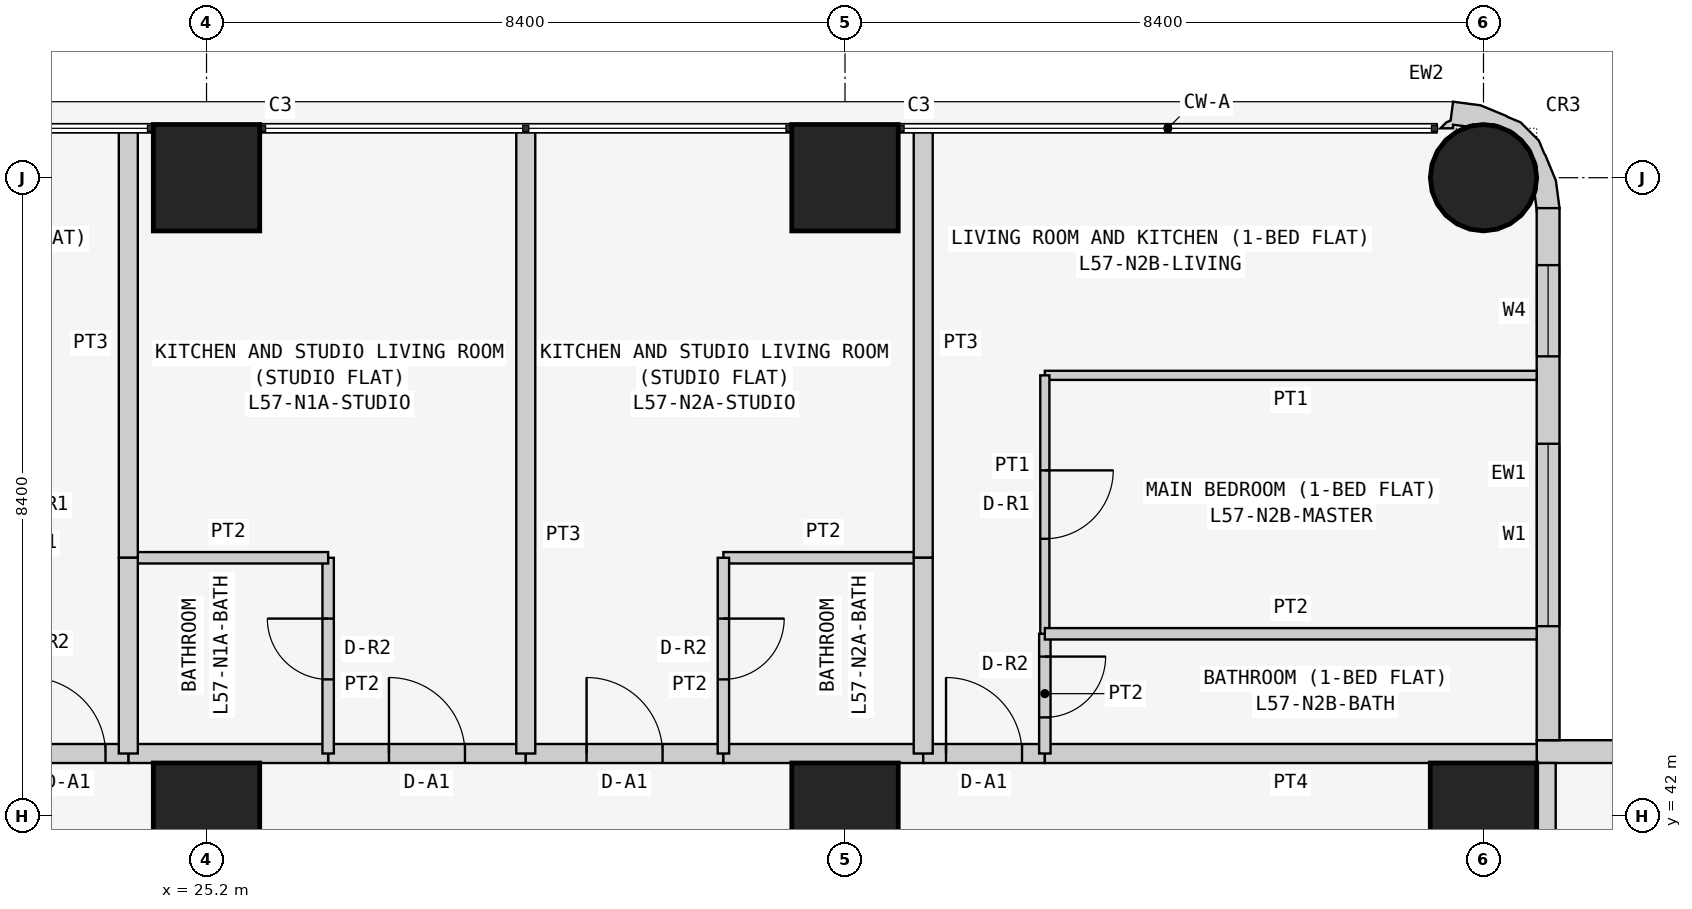
"""IFC4 building model, lengths in metres.
Left out: names, types, materials, properties, quantities, classifications, styles, units other than length and angle.
Written with IfcOpenShell. Run it as: python <this file> out.ifc"""

import sys

from ifc_helpers import new_model, si_unit, direction, frame, frame_2d, origin, origin_2d, place, context, subcontext, project, spatial, polyline, rectangle, circle, outline, extrude, element, fill, save


model = new_model("IFC4")
c1 = context("Model", 3, precision=1e-05, world=origin(), true_north=direction((0.0, 1.0)))
c2 = subcontext(c1, "Body", "Model", "MODEL_VIEW")
j1 = project(units=[si_unit("LENGTHUNIT", "METRE"), si_unit("PLANEANGLEUNIT", "RADIAN")], contexts=[c1])
p1 = place(None, origin())
s1 = spatial("IfcSite", under=j1, at=p1, CompositionType="ELEMENT")
p2 = place(p1, origin())
s2 = spatial("IfcBuilding", under=s1, at=p2, CompositionType="ELEMENT")
p3 = place(p2, frame((0.0, 0.0, 219.3)))
s3 = spatial("IfcBuildingStorey", under=s2, at=p3, CompositionType="ELEMENT", Elevation=219.3)
for number, where, z_axis, x_axis in (
    (1, (25.2, 42.0, 0.0), (0.0, 0.0, 1.0), (1.0, 0.0, 0.0)),
    (2, (25.2, 50.4, 0.0), (0.0, 0.0, 1.0), (1.0, 0.0, 0.0)),
    (3, (33.6, 42.0, 0.0), (0.0, 0.0, 1.0), (1.0, 0.0, 0.0)),
    (4, (33.6, 50.4, 0.0), (0.0, 0.0, 1.0), (1.0, 0.0, 0.0)),
    (5, (42.0, 42.0, 0.0), (0.0, 0.0, 1.0), (1.0, 0.0, 0.0)),
):
    element("IfcColumn", number, at=place(p3, frame(where, z_axis=z_axis, x_axis=x_axis)), inside=s3, PredefinedType="COLUMN", context=c2, shape_type="SweptSolid", body=[
        extrude(rectangle(XDim=1.4, YDim=1.4, at=origin_2d()), origin(), (0.0, 0.0, 1.0), 3.6),
    ])
p4 = place(p3, frame((42.0, 50.4, 0.0), z_axis=(0.0, 0.0, 1.0), x_axis=(1.0, 0.0, 0.0)))
e6 = element("IfcColumn", 6, at=p4, inside=s3, PredefinedType="COLUMN", context=c2, shape_type="SweptSolid", body=[
    extrude(circle(Radius=0.7, at=origin_2d()), origin(), (0.0, 0.0, 1.0), 3.6),
])
p5 = place(p3, frame((50.0, 42.85, 0.0), z_axis=(0.0, 0.0, 1.0), x_axis=(-1.0, 0.0, 0.0)))
e7 = element("IfcWall", 7, at=p5, inside=s3, PredefinedType="SOLIDWALL", context=c2, shape_type="SweptSolid", body=[
    extrude(rectangle(XDim=7.3, YDim=0.3, at=frame_2d((3.65, 0.0))), origin(), (0.0, 0.0, 1.0), 3.45),
])
p6 = place(p5, frame((3.1, 0.0, 0.9)))
e8 = element("IfcOpeningElement", 8, at=p6, cuts=e7, PredefinedType="OPENING", context=c2, shape_type="SweptSolid", body=[
    extrude(rectangle(XDim=2.4, YDim=1.5, at=frame_2d((1.2, 0.75))), frame((0.0, 0.16, 0.0), z_axis=(0.0, -1.0, 0.0), x_axis=(1.0, 0.0, 0.0)), (0.0, 0.0, 1.0), 0.32),
])
p7 = place(p5, frame((0.75, 0.0, 0.9)))
e9 = element("IfcOpeningElement", 9, at=p7, cuts=e7, PredefinedType="OPENING", context=c2, shape_type="SweptSolid", body=[
    extrude(rectangle(XDim=1.2, YDim=1.5, at=frame_2d((0.6, 0.75))), frame((0.0, 0.16, 0.0), z_axis=(0.0, -1.0, 0.0), x_axis=(1.0, 0.0, 0.0)), (0.0, 0.0, 1.0), 0.32),
])
p8 = place(p3, frame((42.85, 43.0, 0.0), z_axis=(0.0, 0.0, 1.0), x_axis=(0.0, 1.0, 0.0)))
e10 = element("IfcWall", 10, at=p8, inside=s3, PredefinedType="SOLIDWALL", context=c2, shape_type="SweptSolid", body=[
    extrude(rectangle(XDim=7.0, YDim=0.3, at=frame_2d((3.5, 0.0))), origin(), (0.0, 0.0, 1.0), 3.45),
])
p9 = place(p8, frame((1.5, 0.0, 0.9)))
e11 = element("IfcOpeningElement", 11, at=p9, cuts=e10, PredefinedType="OPENING", context=c2, shape_type="SweptSolid", body=[
    extrude(rectangle(XDim=2.4, YDim=1.5, at=frame_2d((1.2, 0.75))), frame((0.0, 0.16, 0.0), z_axis=(0.0, -1.0, 0.0), x_axis=(1.0, 0.0, 0.0)), (0.0, 0.0, 1.0), 0.32),
])
p10 = place(p8, frame((5.05, 0.0, 0.9)))
e12 = element("IfcOpeningElement", 12, at=p10, cuts=e10, PredefinedType="OPENING", context=c2, shape_type="SweptSolid", body=[
    extrude(rectangle(XDim=1.2, YDim=1.5, at=frame_2d((0.6, 0.75))), frame((0.0, 0.16, 0.0), z_axis=(0.0, -1.0, 0.0), x_axis=(1.0, 0.0, 0.0)), (0.0, 0.0, 1.0), 0.32),
])
p11 = place(p3, frame((42.724, 50.11, 0.0), z_axis=(0.0, 0.0, 1.0), x_axis=(0.439933741929, 0.898030234854, 0.0)))
e13 = element("IfcWall", 13, at=p11, inside=s3, PredefinedType="SOLIDWALL", context=c2, shape_type="SweptSolid", body=[
    extrude(outline(polyline([(-0.145, -0.044), (0.022, -0.296), (0.327, -0.094), (0.568, 0.18), (0.577, 0.199), (0.7, 0.337), (0.811, 0.661), (0.799, 0.845), (0.803, 0.866), (0.78, 1.231), (0.664, 1.577), (0.426, 1.497), (0.382, 1.536), (0.276, 1.572), (0.349, 1.423), (0.392, 1.444), (0.453, 1.261), (0.51, 1.211), (0.632, 0.961), (0.65, 0.683), (0.56, 0.419), (0.375, 0.21), (0.125, 0.087), (0.05, 0.082), (-0.127, -0.035), (-0.145, -0.044)])), origin(), (0.0, 0.0, 1.0), 3.45),
])
p12 = place(p3, frame((26.8, 42.825, 0.0), z_axis=(0.0, 0.0, 1.0), x_axis=(1.0, 0.0, 0.0)))
e14 = element("IfcWall", 14, at=p12, inside=s3, PredefinedType="PARTITIONING", context=c2, shape_type="SweptSolid", body=[
    extrude(rectangle(XDim=2.6, YDim=0.25, at=frame_2d((1.3, 0.0))), origin(), (0.0, 0.0, 1.0), 3.45),
])
p13 = place(p12, frame((0.8, 0.0, 0.0)))
e15 = element("IfcOpeningElement", 15, at=p13, cuts=e14, PredefinedType="OPENING", context=c2, shape_type="SweptSolid", body=[
    extrude(rectangle(XDim=1.0, YDim=2.1, at=frame_2d((0.5, 1.05))), frame((0.0, 0.135, 0.0), z_axis=(0.0, -1.0, 0.0), x_axis=(1.0, 0.0, 0.0)), (0.0, 0.0, 1.0), 0.27),
])
p14 = place(p3, frame((24.171, 42.825, 0.0), z_axis=(0.0, 0.0, 1.0), x_axis=(1.0, 0.0, 0.0)))
e16 = element("IfcWall", 16, at=p14, inside=s3, PredefinedType="PARTITIONING", context=c2, shape_type="SweptSolid", body=[
    extrude(rectangle(XDim=2.629, YDim=0.25, at=frame_2d((1.314, 0.0))), origin(), (0.0, 0.0, 1.0), 3.45),
])
p15 = place(p3, frame((22.571, 42.825, 0.0), z_axis=(0.0, 0.0, 1.0), x_axis=(1.0, 0.0, 0.0)))
e17 = element("IfcWall", 17, at=p15, inside=s3, PredefinedType="PARTITIONING", context=c2, shape_type="SweptSolid", body=[
    extrude(rectangle(XDim=1.6, YDim=0.25, at=frame_2d((0.8, 0.0))), origin(), (0.0, 0.0, 1.0), 3.45),
])
p16 = place(p15, frame((0.3, 0.0, 0.0)))
e18 = element("IfcOpeningElement", 18, at=p16, cuts=e17, PredefinedType="OPENING", context=c2, shape_type="SweptSolid", body=[
    extrude(rectangle(XDim=1.0, YDim=2.1, at=frame_2d((0.5, 1.05))), frame((0.0, 0.135, 0.0), z_axis=(0.0, -1.0, 0.0), x_axis=(1.0, 0.0, 0.0)), (0.0, 0.0, 1.0), 0.27),
])
p17 = place(p3, frame((29.4, 42.825, 0.0), z_axis=(0.0, 0.0, 1.0), x_axis=(1.0, 0.0, 0.0)))
e19 = element("IfcWall", 19, at=p17, inside=s3, PredefinedType="PARTITIONING", context=c2, shape_type="SweptSolid", body=[
    extrude(rectangle(XDim=2.6, YDim=0.25, at=frame_2d((1.3, 0.0))), origin(), (0.0, 0.0, 1.0), 3.45),
])
p18 = place(p17, frame((0.8, 0.0, 0.0)))
e20 = element("IfcOpeningElement", 20, at=p18, cuts=e19, PredefinedType="OPENING", context=c2, shape_type="SweptSolid", body=[
    extrude(rectangle(XDim=1.0, YDim=2.1, at=frame_2d((0.5, 1.05))), frame((0.0, 0.135, 0.0), z_axis=(0.0, -1.0, 0.0), x_axis=(1.0, 0.0, 0.0)), (0.0, 0.0, 1.0), 0.27),
])
p19 = place(p3, frame((32.0, 42.825, 0.0), z_axis=(0.0, 0.0, 1.0), x_axis=(1.0, 0.0, 0.0)))
e21 = element("IfcWall", 21, at=p19, inside=s3, PredefinedType="PARTITIONING", context=c2, shape_type="SweptSolid", body=[
    extrude(rectangle(XDim=2.629, YDim=0.25, at=frame_2d((1.314, 0.0))), origin(), (0.0, 0.0, 1.0), 3.45),
])
p20 = place(p3, frame((34.629, 42.825, 0.0), z_axis=(0.0, 0.0, 1.0), x_axis=(1.0, 0.0, 0.0)))
e22 = element("IfcWall", 22, at=p20, inside=s3, PredefinedType="PARTITIONING", context=c2, shape_type="SweptSolid", body=[
    extrude(rectangle(XDim=1.6, YDim=0.25, at=frame_2d((0.8, 0.0))), origin(), (0.0, 0.0, 1.0), 3.45),
])
p21 = place(p20, frame((0.3, 0.0, 0.0)))
e23 = element("IfcOpeningElement", 23, at=p21, cuts=e22, PredefinedType="OPENING", context=c2, shape_type="SweptSolid", body=[
    extrude(rectangle(XDim=1.0, YDim=2.1, at=frame_2d((0.5, 1.05))), frame((0.0, 0.135, 0.0), z_axis=(0.0, -1.0, 0.0), x_axis=(1.0, 0.0, 0.0)), (0.0, 0.0, 1.0), 0.27),
])
p22 = place(p3, frame((36.229, 42.825, 0.0), z_axis=(0.0, 0.0, 1.0), x_axis=(1.0, 0.0, 0.0)))
e24 = element("IfcWall", 24, at=p22, inside=s3, PredefinedType="PARTITIONING", context=c2, shape_type="SweptSolid", body=[
    extrude(rectangle(XDim=6.471, YDim=0.25, at=frame_2d((3.235, 0.0))), origin(), (0.0, 0.0, 1.0), 3.45),
])
p23 = place(p3, frame((42.825, 42.7, 0.0), z_axis=(0.0, 0.0, 1.0), x_axis=(0.0, -1.0, 0.0)))
e25 = element("IfcWall", 25, at=p23, inside=s3, PredefinedType="PARTITIONING", context=c2, shape_type="SweptSolid", body=[
    extrude(rectangle(XDim=6.871, YDim=0.25, at=frame_2d((3.436, 0.0))), origin(), (0.0, 0.0, 1.0), 3.45),
])
p24 = place(p3, frame((26.8, 42.825, 0.0), z_axis=(0.0, 0.0, 1.0), x_axis=(0.0, 1.0, 0.0)))
e26 = element("IfcWall", 26, at=p24, inside=s3, PredefinedType="PARTITIONING", context=c2, shape_type="SweptSolid", body=[
    extrude(rectangle(XDim=2.575, YDim=0.15, at=frame_2d((1.288, 0.0))), origin(), (0.0, 0.0, 1.0), 3.45),
])
p25 = place(p24, frame((0.975, 0.0, 0.0)))
e27 = element("IfcOpeningElement", 27, at=p25, cuts=e26, PredefinedType="OPENING", context=c2, shape_type="SweptSolid", body=[
    extrude(rectangle(XDim=0.8, YDim=2.1, at=frame_2d((0.4, 1.05))), frame((0.0, 0.085, 0.0), z_axis=(0.0, -1.0, 0.0), x_axis=(1.0, 0.0, 0.0)), (0.0, 0.0, 1.0), 0.17),
])
p26 = place(p3, frame((26.8, 45.4, 0.0), z_axis=(0.0, 0.0, 1.0), x_axis=(-1.0, 0.0, 0.0)))
e28 = element("IfcWall", 28, at=p26, inside=s3, PredefinedType="PARTITIONING", context=c2, shape_type="SweptSolid", body=[
    extrude(rectangle(XDim=2.629, YDim=0.15, at=frame_2d((1.314, 0.0))), origin(), (0.0, 0.0, 1.0), 3.45),
])
p27 = place(p3, frame((24.171, 45.4, 0.0), z_axis=(0.0, 0.0, 1.0), x_axis=(0.0, 1.0, 0.0)))
e29 = element("IfcWall", 29, at=p27, inside=s3, PredefinedType="PARTITIONING", context=c2, shape_type="SweptSolid", body=[
    extrude(rectangle(XDim=5.65, YDim=0.25, at=frame_2d((2.825, 0.0))), origin(), (0.0, 0.0, 1.0), 3.45),
])
p28 = place(p3, frame((29.4, 51.05, 0.0), z_axis=(0.0, 0.0, 1.0), x_axis=(0.0, -1.0, 0.0)))
e30 = element("IfcWall", 30, at=p28, inside=s3, PredefinedType="PARTITIONING", context=c2, shape_type="SweptSolid", body=[
    extrude(rectangle(XDim=8.225, YDim=0.25, at=frame_2d((4.113, 0.0))), origin(), (0.0, 0.0, 1.0), 2.848),
])
p29 = place(p3, frame((24.171, 45.4, 0.0), z_axis=(0.0, 0.0, 1.0), x_axis=(0.0, -1.0, 0.0)))
e31 = element("IfcWall", 31, at=p29, inside=s3, PredefinedType="PARTITIONING", context=c2, shape_type="SweptSolid", body=[
    extrude(rectangle(XDim=2.575, YDim=0.25, at=frame_2d((1.288, 0.0))), origin(), (0.0, 0.0, 1.0), 3.45),
])
p30 = place(p3, frame((34.629, 45.4, 0.0), z_axis=(0.0, 0.0, 1.0), x_axis=(-1.0, 0.0, 0.0)))
e32 = element("IfcWall", 32, at=p30, inside=s3, PredefinedType="PARTITIONING", context=c2, shape_type="SweptSolid", body=[
    extrude(rectangle(XDim=2.629, YDim=0.15, at=frame_2d((1.314, 0.0))), origin(), (0.0, 0.0, 1.0), 3.45),
])
p31 = place(p3, frame((32.0, 45.4, 0.0), z_axis=(0.0, 0.0, 1.0), x_axis=(0.0, -1.0, 0.0)))
e33 = element("IfcWall", 33, at=p31, inside=s3, PredefinedType="PARTITIONING", context=c2, shape_type="SweptSolid", body=[
    extrude(rectangle(XDim=2.575, YDim=0.15, at=frame_2d((1.288, 0.0))), origin(), (0.0, 0.0, 1.0), 3.45),
])
p32 = place(p31, frame((0.8, 0.0, 0.0)))
e34 = element("IfcOpeningElement", 34, at=p32, cuts=e33, PredefinedType="OPENING", context=c2, shape_type="SweptSolid", body=[
    extrude(rectangle(XDim=0.8, YDim=2.1, at=frame_2d((0.4, 1.05))), frame((0.0, 0.085, 0.0), z_axis=(0.0, -1.0, 0.0), x_axis=(1.0, 0.0, 0.0)), (0.0, 0.0, 1.0), 0.17),
])
p33 = place(p3, frame((34.629, 51.05, 0.0), z_axis=(0.0, 0.0, 1.0), x_axis=(0.0, -1.0, 0.0)))
e35 = element("IfcWall", 35, at=p33, inside=s3, PredefinedType="PARTITIONING", context=c2, shape_type="SweptSolid", body=[
    extrude(rectangle(XDim=5.65, YDim=0.25, at=frame_2d((2.825, 0.0))), origin(), (0.0, 0.0, 1.0), 3.45),
])
p34 = place(p3, frame((34.629, 45.4, 0.0), z_axis=(0.0, 0.0, 1.0), x_axis=(0.0, -1.0, 0.0)))
e36 = element("IfcWall", 36, at=p34, inside=s3, PredefinedType="PARTITIONING", context=c2, shape_type="SweptSolid", body=[
    extrude(rectangle(XDim=2.575, YDim=0.25, at=frame_2d((1.288, 0.0))), origin(), (0.0, 0.0, 1.0), 3.45),
])
p35 = place(p3, frame((36.229, 44.4, 0.0), z_axis=(0.0, 0.0, 1.0), x_axis=(0.0, -1.0, 0.0)))
e37 = element("IfcWall", 37, at=p35, inside=s3, PredefinedType="PARTITIONING", context=c2, shape_type="SweptSolid", body=[
    extrude(rectangle(XDim=1.575, YDim=0.15, at=frame_2d((0.788, 0.0))), origin(), (0.0, 0.0, 1.0), 3.45),
])
p36 = place(p35, frame((0.3, 0.0, 0.0)))
e38 = element("IfcOpeningElement", 38, at=p36, cuts=e37, PredefinedType="OPENING", context=c2, shape_type="SweptSolid", body=[
    extrude(rectangle(XDim=0.8, YDim=2.1, at=frame_2d((0.4, 1.05))), frame((0.0, 0.085, 0.0), z_axis=(0.0, -1.0, 0.0), x_axis=(1.0, 0.0, 0.0)), (0.0, 0.0, 1.0), 0.17),
])
p37 = place(p3, frame((42.7, 47.8, 0.0), z_axis=(0.0, 0.0, 1.0), x_axis=(-1.0, 0.0, 0.0)))
e39 = element("IfcWall", 39, at=p37, inside=s3, PredefinedType="PARTITIONING", context=c2, shape_type="SweptSolid", body=[
    extrude(rectangle(XDim=6.471, YDim=0.12, at=frame_2d((3.235, 0.0))), origin(), (0.0, 0.0, 1.0), 3.45),
])
p38 = place(p3, frame((36.229, 47.8, 0.0), z_axis=(0.0, 0.0, 1.0), x_axis=(0.0, -1.0, 0.0)))
e40 = element("IfcWall", 40, at=p38, inside=s3, PredefinedType="PARTITIONING", context=c2, shape_type="SweptSolid", body=[
    extrude(rectangle(XDim=3.4, YDim=0.12, at=frame_2d((1.7, 0.0))), origin(), (0.0, 0.0, 1.0), 3.45),
])
p39 = place(p38, frame((1.25, 0.0, 0.0)))
e41 = element("IfcOpeningElement", 41, at=p39, cuts=e40, PredefinedType="OPENING", context=c2, shape_type="SweptSolid", body=[
    extrude(rectangle(XDim=0.9, YDim=2.1, at=frame_2d((0.45, 1.05))), frame((0.0, 0.07, 0.0), z_axis=(0.0, -1.0, 0.0), x_axis=(1.0, 0.0, 0.0)), (0.0, 0.0, 1.0), 0.14),
])
p40 = place(p3, frame((36.229, 44.4, 0.0), z_axis=(0.0, 0.0, 1.0), x_axis=(1.0, 0.0, 0.0)))
e42 = element("IfcWall", 42, at=p40, inside=s3, PredefinedType="PARTITIONING", context=c2, shape_type="SweptSolid", body=[
    extrude(rectangle(XDim=6.471, YDim=0.15, at=frame_2d((3.235, 0.0))), origin(), (0.0, 0.0, 1.0), 3.45),
])
p41 = place(p9, origin())
e43 = element("IfcWindow", 43, at=p41, inside=s3, PartitioningType="SINGLE_PANEL", PredefinedType="WINDOW", context=c2, shape_type="SweptSolid", body=[
    extrude(rectangle(XDim=2.4, YDim=1.5, at=frame_2d((1.2, 0.75))), frame((0.0, 0.03, 0.0), z_axis=(0.0, -1.0, 0.0), x_axis=(1.0, 0.0, 0.0)), (0.0, 0.0, 1.0), 0.06),
])
fill(e11, e43)
p42 = place(p10, origin())
e44 = element("IfcWindow", 44, at=p42, inside=s3, PartitioningType="SINGLE_PANEL", PredefinedType="WINDOW", context=c2, shape_type="SweptSolid", body=[
    extrude(rectangle(XDim=1.2, YDim=1.5, at=frame_2d((0.6, 0.75))), frame((0.0, 0.03, 0.0), z_axis=(0.0, -1.0, 0.0), x_axis=(1.0, 0.0, 0.0)), (0.0, 0.0, 1.0), 0.06),
])
fill(e12, e44)
p43 = place(p13, origin())
e45 = element("IfcDoor", 45, at=p43, inside=s3, OperationType="SINGLE_SWING_LEFT", PredefinedType="DOOR", context=c2, shape_type="SweptSolid", body=[
    extrude(rectangle(XDim=1.0, YDim=2.1, at=frame_2d((0.5, 1.05))), frame((0.0, 0.025, 0.0), z_axis=(0.0, -1.0, 0.0), x_axis=(1.0, 0.0, 0.0)), (0.0, 0.0, 1.0), 0.05),
])
fill(e15, e45)
p44 = place(p25, origin())
e46 = element("IfcDoor", 46, at=p44, inside=s3, OperationType="SINGLE_SWING_RIGHT", PredefinedType="DOOR", context=c2, shape_type="SweptSolid", body=[
    extrude(rectangle(XDim=0.8, YDim=2.1, at=frame_2d((0.4, 1.05))), frame((0.0, 0.025, 0.0), z_axis=(0.0, -1.0, 0.0), x_axis=(1.0, 0.0, 0.0)), (0.0, 0.0, 1.0), 0.05),
])
fill(e27, e46)
p45 = place(p16, origin())
e47 = element("IfcDoor", 47, at=p45, inside=s3, OperationType="SINGLE_SWING_LEFT", PredefinedType="DOOR", context=c2, shape_type="SweptSolid", body=[
    extrude(rectangle(XDim=1.0, YDim=2.1, at=frame_2d((0.5, 1.05))), frame((0.0, 0.025, 0.0), z_axis=(0.0, -1.0, 0.0), x_axis=(1.0, 0.0, 0.0)), (0.0, 0.0, 1.0), 0.05),
])
fill(e18, e47)
p46 = place(p18, origin())
e48 = element("IfcDoor", 48, at=p46, inside=s3, OperationType="SINGLE_SWING_LEFT", PredefinedType="DOOR", context=c2, shape_type="SweptSolid", body=[
    extrude(rectangle(XDim=1.0, YDim=2.1, at=frame_2d((0.5, 1.05))), frame((0.0, 0.025, 0.0), z_axis=(0.0, -1.0, 0.0), x_axis=(1.0, 0.0, 0.0)), (0.0, 0.0, 1.0), 0.05),
])
fill(e20, e48)
p47 = place(p32, origin())
e49 = element("IfcDoor", 49, at=p47, inside=s3, OperationType="SINGLE_SWING_LEFT", PredefinedType="DOOR", context=c2, shape_type="SweptSolid", body=[
    extrude(rectangle(XDim=0.8, YDim=2.1, at=frame_2d((0.4, 1.05))), frame((0.0, 0.025, 0.0), z_axis=(0.0, -1.0, 0.0), x_axis=(1.0, 0.0, 0.0)), (0.0, 0.0, 1.0), 0.05),
])
fill(e34, e49)
p48 = place(p21, origin())
e50 = element("IfcDoor", 50, at=p48, inside=s3, OperationType="SINGLE_SWING_LEFT", PredefinedType="DOOR", context=c2, shape_type="SweptSolid", body=[
    extrude(rectangle(XDim=1.0, YDim=2.1, at=frame_2d((0.5, 1.05))), frame((0.0, 0.025, 0.0), z_axis=(0.0, -1.0, 0.0), x_axis=(1.0, 0.0, 0.0)), (0.0, 0.0, 1.0), 0.05),
])
fill(e23, e50)
p49 = place(p36, origin())
e51 = element("IfcDoor", 51, at=p49, inside=s3, OperationType="SINGLE_SWING_LEFT", PredefinedType="DOOR", context=c2, shape_type="SweptSolid", body=[
    extrude(rectangle(XDim=0.8, YDim=2.1, at=frame_2d((0.4, 1.05))), frame((0.0, 0.025, 0.0), z_axis=(0.0, -1.0, 0.0), x_axis=(1.0, 0.0, 0.0)), (0.0, 0.0, 1.0), 0.05),
])
fill(e38, e51)
p50 = place(p39, origin())
e52 = element("IfcDoor", 52, at=p50, inside=s3, OperationType="SINGLE_SWING_LEFT", PredefinedType="DOOR", context=c2, shape_type="SweptSolid", body=[
    extrude(rectangle(XDim=0.9, YDim=2.1, at=frame_2d((0.45, 1.05))), frame((0.0, 0.025, 0.0), z_axis=(0.0, -1.0, 0.0), x_axis=(1.0, 0.0, 0.0)), (0.0, 0.0, 1.0), 0.05),
])
fill(e41, e52)
save(model, sys.argv[1])
